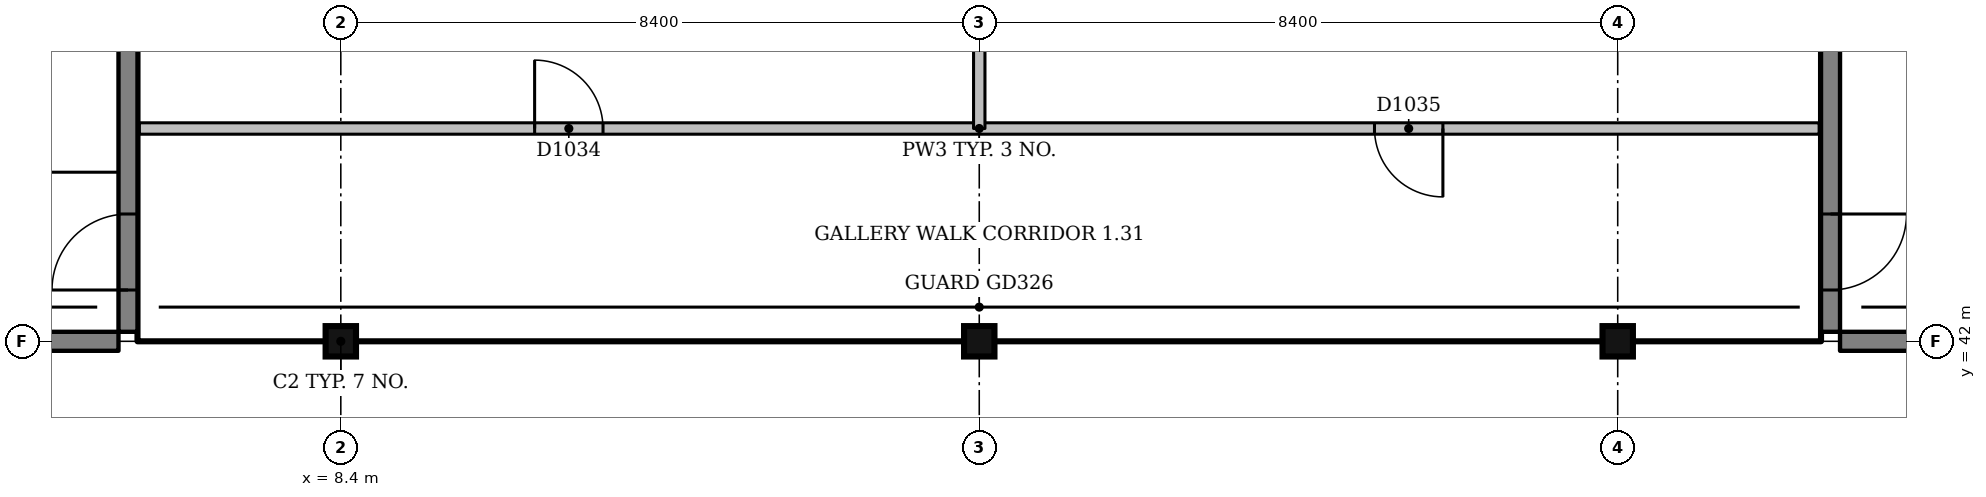
"""IFC4 building model, lengths in metres.
Left out: names, types, materials, properties, quantities, classifications, styles, units other than length and angle.
Written with IfcOpenShell. Run it as: python <this file> out.ifc"""

import sys

from ifc_helpers import new_model, si_unit, direction, frame, frame_2d, origin, origin_2d, place, context, subcontext, project, spatial, rectangle, extrude, element, fill, save


model = new_model("IFC4")
c1 = context("Model", 3, precision=1e-05, world=origin(), true_north=direction((0.0, 1.0)))
c2 = subcontext(c1, "Body", "Model", "MODEL_VIEW")
j1 = project(units=[si_unit("LENGTHUNIT", "METRE"), si_unit("PLANEANGLEUNIT", "RADIAN")], contexts=[c1])
p1 = place(None, origin())
s1 = spatial("IfcSite", under=j1, at=p1, CompositionType="ELEMENT")
p2 = place(p1, origin())
s2 = spatial("IfcBuilding", under=s1, at=p2, CompositionType="ELEMENT")
p3 = place(p2, frame((0.0, 0.0, 4.5)))
s3 = spatial("IfcBuildingStorey", under=s2, at=p3, CompositionType="ELEMENT", Elevation=4.5)
for number, where, z_axis, x_axis in (
    (1, (8.4, 42.0, 0.0), (0.0, 0.0, 1.0), (1.0, 0.0, 0.0)),
    (2, (16.8, 42.0, 0.0), (0.0, 0.0, 1.0), (1.0, 0.0, 0.0)),
    (3, (25.2, 42.0, 0.0), (0.0, 0.0, 1.0), (1.0, 0.0, 0.0)),
):
    element("IfcColumn", number, at=place(p3, frame(where, z_axis=z_axis, x_axis=x_axis)), inside=s3, PredefinedType="COLUMN", context=c2, shape_type="SweptSolid", body=[
        extrude(rectangle(XDim=0.4, YDim=0.4, at=origin_2d()), origin(), (0.0, 0.0, 1.0), 4.5),
    ])
p4 = place(p3, frame((5.6, 42.125, 0.0), z_axis=(0.0, 0.0, 1.0), x_axis=(0.0, 1.0, 0.0)))
e4 = element("IfcWall", 4, at=p4, inside=s3, PredefinedType="SHEAR", context=c2, shape_type="SweptSolid", body=[
    extrude(rectangle(XDim=8.15, YDim=0.25, at=frame_2d((4.075, 0.0))), origin(), (0.0, 0.0, 1.0), 4.5),
])
p5 = place(p4, frame((0.55, 0.0, 0.0)))
e5 = element("IfcOpeningElement", 5, at=p5, cuts=e4, PredefinedType="OPENING", context=c2, shape_type="SweptSolid", body=[
    extrude(rectangle(XDim=1.0, YDim=2.1, at=frame_2d((0.5, 1.05))), frame((0.0, 0.135, 0.0), z_axis=(0.0, -1.0, 0.0), x_axis=(1.0, 0.0, 0.0)), (0.0, 0.0, 1.0), 0.27),
])
p6 = place(p3, frame((28.0, 42.125, 0.0), z_axis=(0.0, 0.0, 1.0), x_axis=(0.0, 1.0, 0.0)))
e6 = element("IfcWall", 6, at=p6, inside=s3, PredefinedType="SHEAR", context=c2, shape_type="SweptSolid", body=[
    extrude(rectangle(XDim=8.15, YDim=0.25, at=frame_2d((4.075, 0.0))), origin(), (0.0, 0.0, 1.0), 4.5),
])
p7 = place(p6, frame((0.55, 0.0, 0.0)))
e7 = element("IfcOpeningElement", 7, at=p7, cuts=e6, PredefinedType="OPENING", context=c2, shape_type="SweptSolid", body=[
    extrude(rectangle(XDim=1.0, YDim=2.1, at=frame_2d((0.5, 1.05))), frame((0.0, 0.135, 0.0), z_axis=(0.0, -1.0, 0.0), x_axis=(1.0, 0.0, 0.0)), (0.0, 0.0, 1.0), 0.27),
])
p8 = place(p3, frame((5.75, 44.8, 0.0), z_axis=(0.0, 0.0, 1.0), x_axis=(1.0, 0.0, 0.0)))
e8 = element("IfcWall", 8, at=p8, inside=s3, PredefinedType="PARTITIONING", context=c2, shape_type="SweptSolid", body=[
    extrude(rectangle(XDim=22.1, YDim=0.15, at=frame_2d((11.05, 0.0))), origin(), (0.0, 0.0, 1.0), 4.15),
])
p9 = place(p8, frame((5.2, 0.0, 0.0)))
e9 = element("IfcOpeningElement", 9, at=p9, cuts=e8, PredefinedType="OPENING", context=c2, shape_type="SweptSolid", body=[
    extrude(rectangle(XDim=0.9, YDim=2.1, at=frame_2d((0.45, 1.05))), frame((0.0, 0.085, 0.0), z_axis=(0.0, -1.0, 0.0), x_axis=(1.0, 0.0, 0.0)), (0.0, 0.0, 1.0), 0.17),
])
p10 = place(p8, frame((16.25, 0.0, 0.0)))
e10 = element("IfcOpeningElement", 10, at=p10, cuts=e8, PredefinedType="OPENING", context=c2, shape_type="SweptSolid", body=[
    extrude(rectangle(XDim=0.9, YDim=2.1, at=frame_2d((0.45, 1.05))), frame((0.0, 0.085, 0.0), z_axis=(0.0, -1.0, 0.0), x_axis=(1.0, 0.0, 0.0)), (0.0, 0.0, 1.0), 0.17),
])
p11 = place(p3, frame((16.8, 44.8, 0.0), z_axis=(0.0, 0.0, 1.0), x_axis=(0.0, 1.0, 0.0)))
e11 = element("IfcWall", 11, at=p11, inside=s3, PredefinedType="PARTITIONING", context=c2, shape_type="SweptSolid", body=[
    extrude(rectangle(XDim=5.1, YDim=0.15, at=frame_2d((2.55, 0.0))), origin(), (0.0, 0.0, 1.0), 2.489),
])
p12 = place(p3, frame((0.25, 42.0, 0.0), z_axis=(0.0, 0.0, 1.0), x_axis=(1.0, 0.0, 0.0)))
e12 = element("IfcWall", 12, at=p12, inside=s3, PredefinedType="SHEAR", context=c2, shape_type="SweptSolid", body=[
    extrude(rectangle(XDim=5.225, YDim=0.25, at=frame_2d((2.613, 0.0))), origin(), (0.0, 0.0, 1.0), 4.5),
])
p13 = place(p3, frame((28.125, 42.0, 0.0), z_axis=(0.0, 0.0, 1.0), x_axis=(1.0, 0.0, 0.0)))
e13 = element("IfcWall", 13, at=p13, inside=s3, PredefinedType="SHEAR", context=c2, shape_type="SweptSolid", body=[
    extrude(rectangle(XDim=5.275, YDim=0.25, at=frame_2d((2.637, 0.0))), origin(), (0.0, 0.0, 1.0), 4.5),
])
p14 = place(p9, origin())
e14 = element("IfcDoor", 14, at=p14, inside=s3, OperationType="SINGLE_SWING_LEFT", PredefinedType="DOOR", context=c2, shape_type="SweptSolid", body=[
    extrude(rectangle(XDim=0.9, YDim=2.1, at=frame_2d((0.45, 1.05))), frame((0.0, 0.025, 0.0), z_axis=(0.0, -1.0, 0.0), x_axis=(1.0, 0.0, 0.0)), (0.0, 0.0, 1.0), 0.05),
])
fill(e9, e14)
p15 = place(p10, origin())
e15 = element("IfcDoor", 15, at=p15, inside=s3, OperationType="SINGLE_SWING_RIGHT", PredefinedType="DOOR", context=c2, shape_type="SweptSolid", body=[
    extrude(rectangle(XDim=0.9, YDim=2.1, at=frame_2d((0.45, 1.05))), frame((0.0, 0.025, 0.0), z_axis=(0.0, -1.0, 0.0), x_axis=(1.0, 0.0, 0.0)), (0.0, 0.0, 1.0), 0.05),
])
fill(e10, e15)
p16 = place(p5, origin())
e16 = element("IfcDoor", 16, at=p16, inside=s3, OperationType="SINGLE_SWING_LEFT", PredefinedType="DOOR", context=c2, shape_type="SweptSolid", body=[
    extrude(rectangle(XDim=1.0, YDim=2.1, at=frame_2d((0.5, 1.05))), frame((0.0, 0.025, 0.0), z_axis=(0.0, -1.0, 0.0), x_axis=(1.0, 0.0, 0.0)), (0.0, 0.0, 1.0), 0.05),
])
fill(e5, e16)
p17 = place(p7, origin())
e17 = element("IfcDoor", 17, at=p17, inside=s3, OperationType="SINGLE_SWING_RIGHT", PredefinedType="DOOR", context=c2, shape_type="SweptSolid", body=[
    extrude(rectangle(XDim=1.0, YDim=2.1, at=frame_2d((0.5, 1.05))), frame((0.0, 0.025, 0.0), z_axis=(0.0, -1.0, 0.0), x_axis=(1.0, 0.0, 0.0)), (0.0, 0.0, 1.0), 0.05),
])
fill(e7, e17)
save(model, sys.argv[1])
